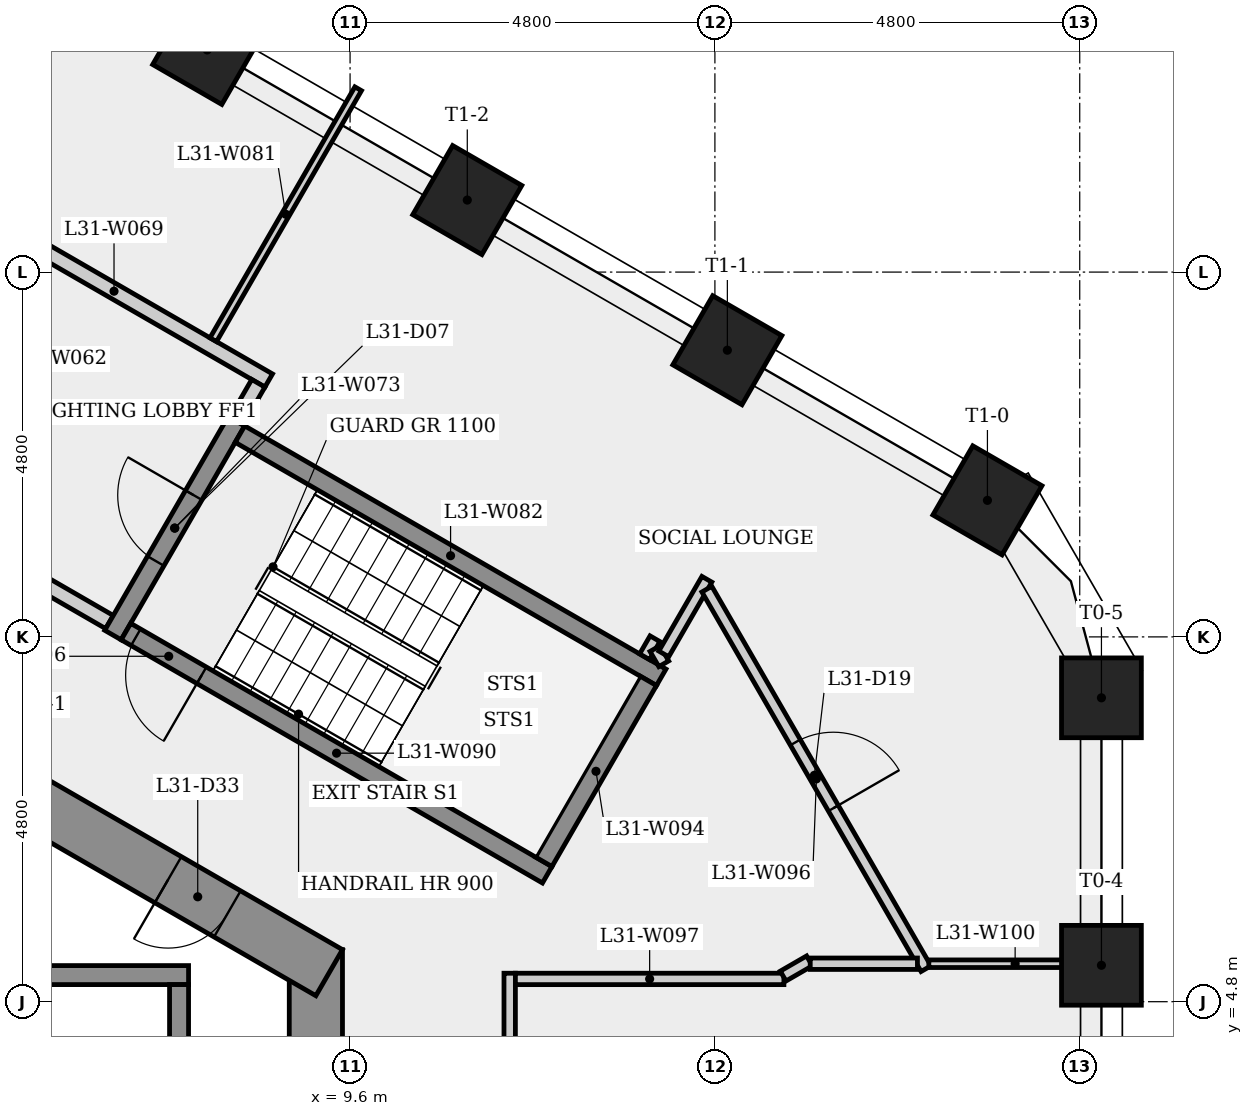
"""IFC4 building model, lengths in metres.
Left out: names, types, materials, properties, quantities, classifications, styles, units other than length and angle.
Written with IfcOpenShell. Run it as: python <this file> out.ifc"""

import sys

from ifc_helpers import new_model, si_unit, direction, frame, frame_2d, origin, origin_2d, place, context, subcontext, project, spatial, rectangle, extrude, element, fill, save


model = new_model("IFC4")
c1 = context("Model", 3, precision=1e-05, world=origin(), true_north=direction((0.0, 1.0)))
c2 = subcontext(c1, "Body", "Model", "MODEL_VIEW")
j1 = project(units=[si_unit("LENGTHUNIT", "METRE"), si_unit("PLANEANGLEUNIT", "RADIAN")], contexts=[c1])
p1 = place(None, origin())
s1 = spatial("IfcSite", under=j1, at=p1, CompositionType="ELEMENT")
p2 = place(p1, origin())
s2 = spatial("IfcBuilding", under=s1, at=p2, CompositionType="ELEMENT")
p3 = place(p2, frame((0.0, 0.0, 117.1)))
s3 = spatial("IfcBuildingStorey", under=s2, at=p3, CompositionType="ELEMENT", Elevation=117.1)
p4 = place(p3, frame((9.15, -5.485, 0.0), z_axis=(0.0, 0.0, 1.0), x_axis=(0.0, 1.0, 0.0)))
e1 = element("IfcWall", 1, at=p4, inside=s3, PredefinedType="SHEAR", context=c2, shape_type="SweptSolid", body=[
    extrude(rectangle(XDim=10.97, YDim=0.7, at=frame_2d((5.485, 0.0))), origin(), (0.0, 0.0, 1.0), 3.4),
])
p5 = place(p4, frame((4.685, 0.0, 0.0)))
e2 = element("IfcOpeningElement", 2, at=p5, cuts=e1, PredefinedType="OPENING", context=c2, shape_type="SweptSolid", body=[
    extrude(rectangle(XDim=1.6, YDim=2.1, at=frame_2d((0.8, 1.05))), frame((0.0, 0.36, 0.0), z_axis=(0.0, -1.0, 0.0), x_axis=(1.0, 0.0, 0.0)), (0.0, 0.0, 1.0), 0.72),
])
p6 = place(p3, frame((9.325, 5.182, 0.0), z_axis=(0.0, 0.0, 1.0), x_axis=(-0.866023993627, 0.500002442456, 0.0)))
e3 = element("IfcWall", 3, at=p6, inside=s3, PredefinedType="SHEAR", context=c2, shape_type="SweptSolid", body=[
    extrude(rectangle(XDim=10.97, YDim=0.7, at=frame_2d((5.485, 0.0))), origin(), (0.0, 0.0, 1.0), 3.4),
])
p7 = place(p6, frame((8.267, 0.0, 0.0)))
e4 = element("IfcOpeningElement", 4, at=p7, cuts=e3, PredefinedType="OPENING", context=c2, shape_type="SweptSolid", body=[
    extrude(rectangle(XDim=0.9, YDim=2.1, at=frame_2d((0.45, 1.05))), frame((0.0, 0.36, 0.0), z_axis=(0.0, -1.0, 0.0), x_axis=(1.0, 0.0, 0.0)), (0.0, 0.0, 1.0), 0.72),
])
p8 = place(p6, frame((1.547, 0.0, 0.0)))
e5 = element("IfcOpeningElement", 5, at=p8, cuts=e3, PredefinedType="OPENING", context=c2, shape_type="SweptSolid", body=[
    extrude(rectangle(XDim=0.9, YDim=2.1, at=frame_2d((0.45, 1.05))), frame((0.0, 0.36, 0.0), z_axis=(0.0, -1.0, 0.0), x_axis=(1.0, 0.0, 0.0)), (0.0, 0.0, 1.0), 0.72),
])
for number, where, z_axis, x_axis in (
    (6, (19.486, 5.279, 0.0), (0.0, 0.0, 1.0), (1.0, 0.0, 0.0)),
    (7, (19.486, 8.798, 0.0), (0.0, 0.0, 1.0), (1.0, 0.0, 0.0)),
    (8, (17.986, 11.396, 0.0), (0.0, 0.0, 1.0), (0.5, 0.866, 0.0)),
    (9, (14.564, 13.372, 0.0), (0.0, 0.0, 1.0), (0.5, 0.866, 0.0)),
    (10, (11.142, 15.348, 0.0), (0.0, 0.0, 1.0), (0.5, 0.866, 0.0)),
    (11, (7.72, 17.323, 0.0), (0.0, 0.0, 1.0), (0.5, 0.866, 0.0)),
):
    element("IfcColumn", number, at=place(p3, frame(where, z_axis=z_axis, x_axis=x_axis)), inside=s3, PredefinedType="COLUMN", context=c2, shape_type="SweptSolid", body=[
        extrude(rectangle(XDim=1.05, YDim=1.05, at=origin_2d()), origin(), (0.0, 0.0, 1.0), 3.4),
    ])
p9 = place(p3, frame((-7.225, 5.15, 0.0), z_axis=(0.0, 0.0, 1.0), x_axis=(1.0, 0.0, 0.0)))
e12 = element("IfcWall", 12, at=p9, inside=s3, PredefinedType="SHEAR", context=c2, shape_type="SweptSolid", body=[
    extrude(rectangle(XDim=14.7, YDim=0.25, at=frame_2d((7.35, 0.0))), origin(), (0.0, 0.0, 1.0), 3.0),
])
p10 = place(p3, frame((4.459, 15.323, 0.0), z_axis=(0.0, 0.0, 1.0), x_axis=(0.866016039709, -0.500016218704, 0.0)))
e13 = element("IfcWall", 13, at=p10, inside=s3, PredefinedType="PARTITIONING", context=c2, shape_type="SweptSolid", body=[
    extrude(rectangle(XDim=4.7, YDim=0.2, at=frame_2d((2.35, 0.0))), origin(), (0.0, 0.0, 1.0), 3.0),
])
p11 = place(p3, frame((6.435, 9.795, 0.0), z_axis=(0.0, 0.0, 1.0), x_axis=(-0.866012907634, 0.500021643343, 0.0)))
e14 = element("IfcWall", 14, at=p11, inside=s3, PredefinedType="PARTITIONING", context=c2, shape_type="SweptSolid", body=[
    extrude(rectangle(XDim=4.45, YDim=0.2, at=frame_2d((2.225, 0.0))), origin(), (0.0, 0.0, 1.0), 3.0),
])
p12 = place(p11, frame((1.675, 0.0, 0.0)))
e15 = element("IfcOpeningElement", 15, at=p12, cuts=e14, PredefinedType="OPENING", context=c2, shape_type="SweptSolid", body=[
    extrude(rectangle(XDim=1.1, YDim=2.1, at=frame_2d((0.55, 1.05))), frame((0.0, 0.11, 0.0), z_axis=(0.0, -1.0, 0.0), x_axis=(1.0, 0.0, 0.0)), (0.0, 0.0, 1.0), 0.22),
])
p13 = place(p3, frame((6.48, 9.624, 0.0), z_axis=(0.0, 0.0, 1.0), x_axis=(0.500017246033, 0.866015446554, 0.0)))
e16 = element("IfcWall", 16, at=p13, inside=s3, PredefinedType="SHEAR", context=c2, shape_type="SweptSolid", body=[
    extrude(rectangle(XDim=3.25, YDim=0.25, at=frame_2d((1.625, 0.0))), origin(), (0.0, 0.0, 1.0), 3.0),
])
p14 = place(p13, frame((1.125, 0.0, 0.0)))
e17 = element("IfcOpeningElement", 17, at=p14, cuts=e16, PredefinedType="OPENING", context=c2, shape_type="SweptSolid", body=[
    extrude(rectangle(XDim=1.0, YDim=2.1, at=frame_2d((0.5, 1.05))), frame((0.0, 0.135, 0.0), z_axis=(0.0, -1.0, 0.0), x_axis=(1.0, 0.0, 0.0)), (0.0, 0.0, 1.0), 0.27),
])
p15 = place(p3, frame((7.35, 5.025, 0.0), z_axis=(0.0, 0.0, 1.0), x_axis=(0.0, -1.0, 0.0)))
e18 = element("IfcWall", 18, at=p15, inside=s3, PredefinedType="SHEAR", context=c2, shape_type="SweptSolid", body=[
    extrude(rectangle(XDim=3.1, YDim=0.25, at=frame_2d((1.55, 0.0))), origin(), (0.0, 0.0, 1.0), 3.4),
])
p16 = place(p3, frame((7.8, 13.51, 0.0), z_axis=(0.0, 0.0, 1.0), x_axis=(0.499988487492, 0.866032050432, 0.0)))
e19 = element("IfcWall", 19, at=p16, inside=s3, PredefinedType="PARTITIONING", context=c2, shape_type="SweptSolid", body=[
    extrude(rectangle(XDim=3.813, YDim=0.1, at=frame_2d((1.906, 0.0))), origin(), (0.0, 0.0, 1.0), 3.0),
])
p17 = place(p3, frame((8.151, 12.268, 0.0), z_axis=(0.0, 0.0, 1.0), x_axis=(0.866025499775, -0.499999833739, 0.0)))
e20 = element("IfcWall", 20, at=p17, inside=s3, PredefinedType="SHEAR", context=c2, shape_type="SweptSolid", body=[
    extrude(rectangle(XDim=6.4, YDim=0.25, at=frame_2d((3.2, 0.0))), origin(), (0.0, 0.0, 1.0), 3.0),
])
p18 = place(p3, frame((8.393, 12.937, 0.0), z_axis=(0.0, 0.0, 1.0), x_axis=(-0.500065409566, -0.86598763626, 0.0)))
e21 = element("IfcWall", 21, at=p18, inside=s3, PredefinedType="PARTITIONING", context=c2, shape_type="SweptSolid", body=[
    extrude(rectangle(XDim=0.575, YDim=0.2, at=frame_2d((0.288, 0.0))), origin(), (0.0, 0.0, 1.0), 3.0),
])
p19 = place(p3, frame((11.7, -5.225, 0.0), z_axis=(0.0, 0.0, 1.0), x_axis=(0.0, 1.0, 0.0)))
e22 = element("IfcWall", 22, at=p19, inside=s3, PredefinedType="PARTITIONING", context=c2, shape_type="SweptSolid", body=[
    extrude(rectangle(XDim=10.399, YDim=0.15, at=frame_2d((5.2, 0.0))), origin(), (0.0, 0.0, 1.0), 3.0),
])
p20 = place(p19, frame((6.865, 0.0, 0.0)))
e23 = element("IfcOpeningElement", 23, at=p20, cuts=e22, PredefinedType="OPENING", context=c2, shape_type="SweptSolid", body=[
    extrude(rectangle(XDim=1.0, YDim=2.1, at=frame_2d((0.5, 1.05))), frame((0.0, 0.085, 0.0), z_axis=(0.0, -1.0, 0.0), x_axis=(1.0, 0.0, 0.0)), (0.0, 0.0, 1.0), 0.17),
])
p21 = place(p3, frame((12.194, 6.47, 0.0), z_axis=(0.0, 0.0, 1.0), x_axis=(-0.866025499775, 0.499999833739, 0.0)))
e24 = element("IfcWall", 24, at=p21, inside=s3, PredefinedType="SHEAR", context=c2, shape_type="SweptSolid", body=[
    extrude(rectangle(XDim=6.4, YDim=0.25, at=frame_2d((3.2, 0.0))), origin(), (0.0, 0.0, 1.0), 3.0),
])
p22 = place(p21, frame((5.25, 0.0, 0.0)))
e25 = element("IfcOpeningElement", 25, at=p22, cuts=e24, PredefinedType="OPENING", context=c2, shape_type="SweptSolid", body=[
    extrude(rectangle(XDim=1.0, YDim=2.1, at=frame_2d((0.5, 1.05))), frame((0.0, 0.135, 0.0), z_axis=(0.0, -1.0, 0.0), x_axis=(1.0, 0.0, 0.0)), (0.0, 0.0, 1.0), 0.27),
])
p23 = place(p3, frame((13.475, 9.339, 0.0), z_axis=(0.0, 0.0, 1.0), x_axis=(0.500262741071, 0.865873657005, 0.0)))
e26 = element("IfcWall", 26, at=p23, inside=s3, PredefinedType="PARTITIONING", context=c2, shape_type="SweptSolid", body=[
    extrude(rectangle(XDim=0.274, YDim=0.15, at=frame_2d((0.137, 0.0))), origin(), (0.0, 0.0, 1.0), 3.0),
])
p24 = place(p3, frame((13.612, 9.446, 0.0), z_axis=(0.0, 0.0, 1.0), x_axis=(0.500119048086, -0.865956660429, 0.0)))
e27 = element("IfcWall", 27, at=p24, inside=s3, PredefinedType="PARTITIONING", context=c2, shape_type="SweptSolid", body=[
    extrude(rectangle(XDim=0.231, YDim=0.15, at=frame_2d((0.115, 0.0))), origin(), (0.0, 0.0, 1.0), 3.0),
])
p25 = place(p3, frame((13.523, 9.022, 0.0), z_axis=(0.0, 0.0, 1.0), x_axis=(-0.500034990121, -0.866005201286, 0.0)))
e28 = element("IfcWall", 28, at=p25, inside=s3, PredefinedType="SHEAR", context=c2, shape_type="SweptSolid", body=[
    extrude(rectangle(XDim=2.75, YDim=0.25, at=frame_2d((1.375, 0.0))), origin(), (0.0, 0.0, 1.0), 3.0),
])
p26 = place(p3, frame((13.727, 9.376, 0.0), z_axis=(0.0, 0.0, 1.0), x_axis=(0.500051640322, 0.865995587178, 0.0)))
e29 = element("IfcWall", 29, at=p26, inside=s3, PredefinedType="PARTITIONING", context=c2, shape_type="SweptSolid", body=[
    extrude(rectangle(XDim=1.134, YDim=0.15, at=frame_2d((0.567, 0.0))), origin(), (0.0, 0.0, 1.0), 3.0),
])
p27 = place(p3, frame((14.294, 10.228, 0.0), z_axis=(0.0, 0.0, 1.0), x_axis=(0.499996112969, -0.866027647951, 0.0)))
e30 = element("IfcWall", 30, at=p27, inside=s3, PredefinedType="PARTITIONING", context=c2, shape_type="SweptSolid", body=[
    extrude(rectangle(XDim=5.766, YDim=0.15, at=frame_2d((2.883, 0.0))), origin(), (0.0, 0.0, 1.0), 3.0),
])
p28 = place(p27, frame((2.328, 0.0, 0.0)))
e31 = element("IfcOpeningElement", 31, at=p28, cuts=e30, PredefinedType="OPENING", context=c2, shape_type="SweptSolid", body=[
    extrude(rectangle(XDim=1.0, YDim=2.1, at=frame_2d((0.5, 1.05))), frame((0.0, 0.085, 0.0), z_axis=(0.0, -1.0, 0.0), x_axis=(1.0, 0.0, 0.0)), (0.0, 0.0, 1.0), 0.17),
])
p29 = place(p3, frame((15.308, 5.1, 0.0), z_axis=(0.0, 0.0, 1.0), x_axis=(-1.0, 0.0, 0.0)))
e32 = element("IfcWall", 32, at=p29, inside=s3, PredefinedType="PARTITIONING", context=c2, shape_type="SweptSolid", body=[
    extrude(rectangle(XDim=3.533, YDim=0.15, at=frame_2d((1.767, 0.0))), origin(), (0.0, 0.0, 1.0), 3.0),
])
p30 = place(p3, frame((15.644, 5.337, 0.0), z_axis=(0.0, 0.0, 1.0), x_axis=(-0.866094119867, -0.499880961361, 0.0)))
e33 = element("IfcWall", 33, at=p30, inside=s3, PredefinedType="PARTITIONING", context=c2, shape_type="SweptSolid", body=[
    extrude(rectangle(XDim=0.4, YDim=0.15, at=frame_2d((0.2, 0.0))), origin(), (0.0, 0.0, 1.0), 3.0),
])
p31 = place(p3, frame((17.215, 5.3, 0.0), z_axis=(0.0, 0.0, 1.0), x_axis=(1.0, 0.0, 0.0)))
e34 = element("IfcWall", 34, at=p31, inside=s3, PredefinedType="PARTITIONING", context=c2, shape_type="SweptSolid", body=[
    extrude(rectangle(XDim=2.271, YDim=0.1, at=frame_2d((1.135, 0.0))), origin(), (0.0, 0.0, 1.0), 3.0),
])
p32 = place(p3, frame((17.065, 5.3, 0.0), z_axis=(0.0, 0.0, 1.0), x_axis=(-1.0, 0.0, 0.0)))
e35 = element("IfcWall", 35, at=p32, inside=s3, PredefinedType="PARTITIONING", context=c2, shape_type="SweptSolid", body=[
    extrude(rectangle(XDim=1.41, YDim=0.15, at=frame_2d((0.705, 0.0))), origin(), (0.0, 0.0, 1.0), 3.0),
])
p33 = place(p22, origin())
e36 = element("IfcDoor", 36, at=p33, inside=s3, OperationType="SINGLE_SWING_LEFT", PredefinedType="DOOR", context=c2, shape_type="SweptSolid", body=[
    extrude(rectangle(XDim=1.0, YDim=2.1, at=frame_2d((0.5, 1.05))), frame((0.0, 0.025, 0.0), z_axis=(0.0, -1.0, 0.0), x_axis=(1.0, 0.0, 0.0)), (0.0, 0.0, 1.0), 0.05),
])
fill(e25, e36)
p34 = place(p14, origin())
e37 = element("IfcDoor", 37, at=p34, inside=s3, OperationType="SINGLE_SWING_RIGHT", PredefinedType="DOOR", context=c2, shape_type="SweptSolid", body=[
    extrude(rectangle(XDim=1.0, YDim=2.1, at=frame_2d((0.5, 1.05))), frame((0.0, 0.025, 0.0), z_axis=(0.0, -1.0, 0.0), x_axis=(1.0, 0.0, 0.0)), (0.0, 0.0, 1.0), 0.05),
])
fill(e17, e37)
p35 = place(p28, origin())
e38 = element("IfcDoor", 38, at=p35, inside=s3, OperationType="SINGLE_SWING_RIGHT", PredefinedType="DOOR", context=c2, shape_type="SweptSolid", body=[
    extrude(rectangle(XDim=1.0, YDim=2.1, at=frame_2d((0.5, 1.05))), frame((0.0, 0.025, 0.0), z_axis=(0.0, -1.0, 0.0), x_axis=(1.0, 0.0, 0.0)), (0.0, 0.0, 1.0), 0.05),
])
fill(e31, e38)
p36 = place(p8, origin())
e39 = element("IfcDoor", 39, at=p36, inside=s3, OperationType="SINGLE_SWING_RIGHT", PredefinedType="DOOR", context=c2, shape_type="SweptSolid", body=[
    extrude(rectangle(XDim=0.9, YDim=2.1, at=frame_2d((0.45, 1.05))), frame((0.0, 0.025, 0.0), z_axis=(0.0, -1.0, 0.0), x_axis=(1.0, 0.0, 0.0)), (0.0, 0.0, 1.0), 0.05),
])
fill(e5, e39)
save(model, sys.argv[1])
